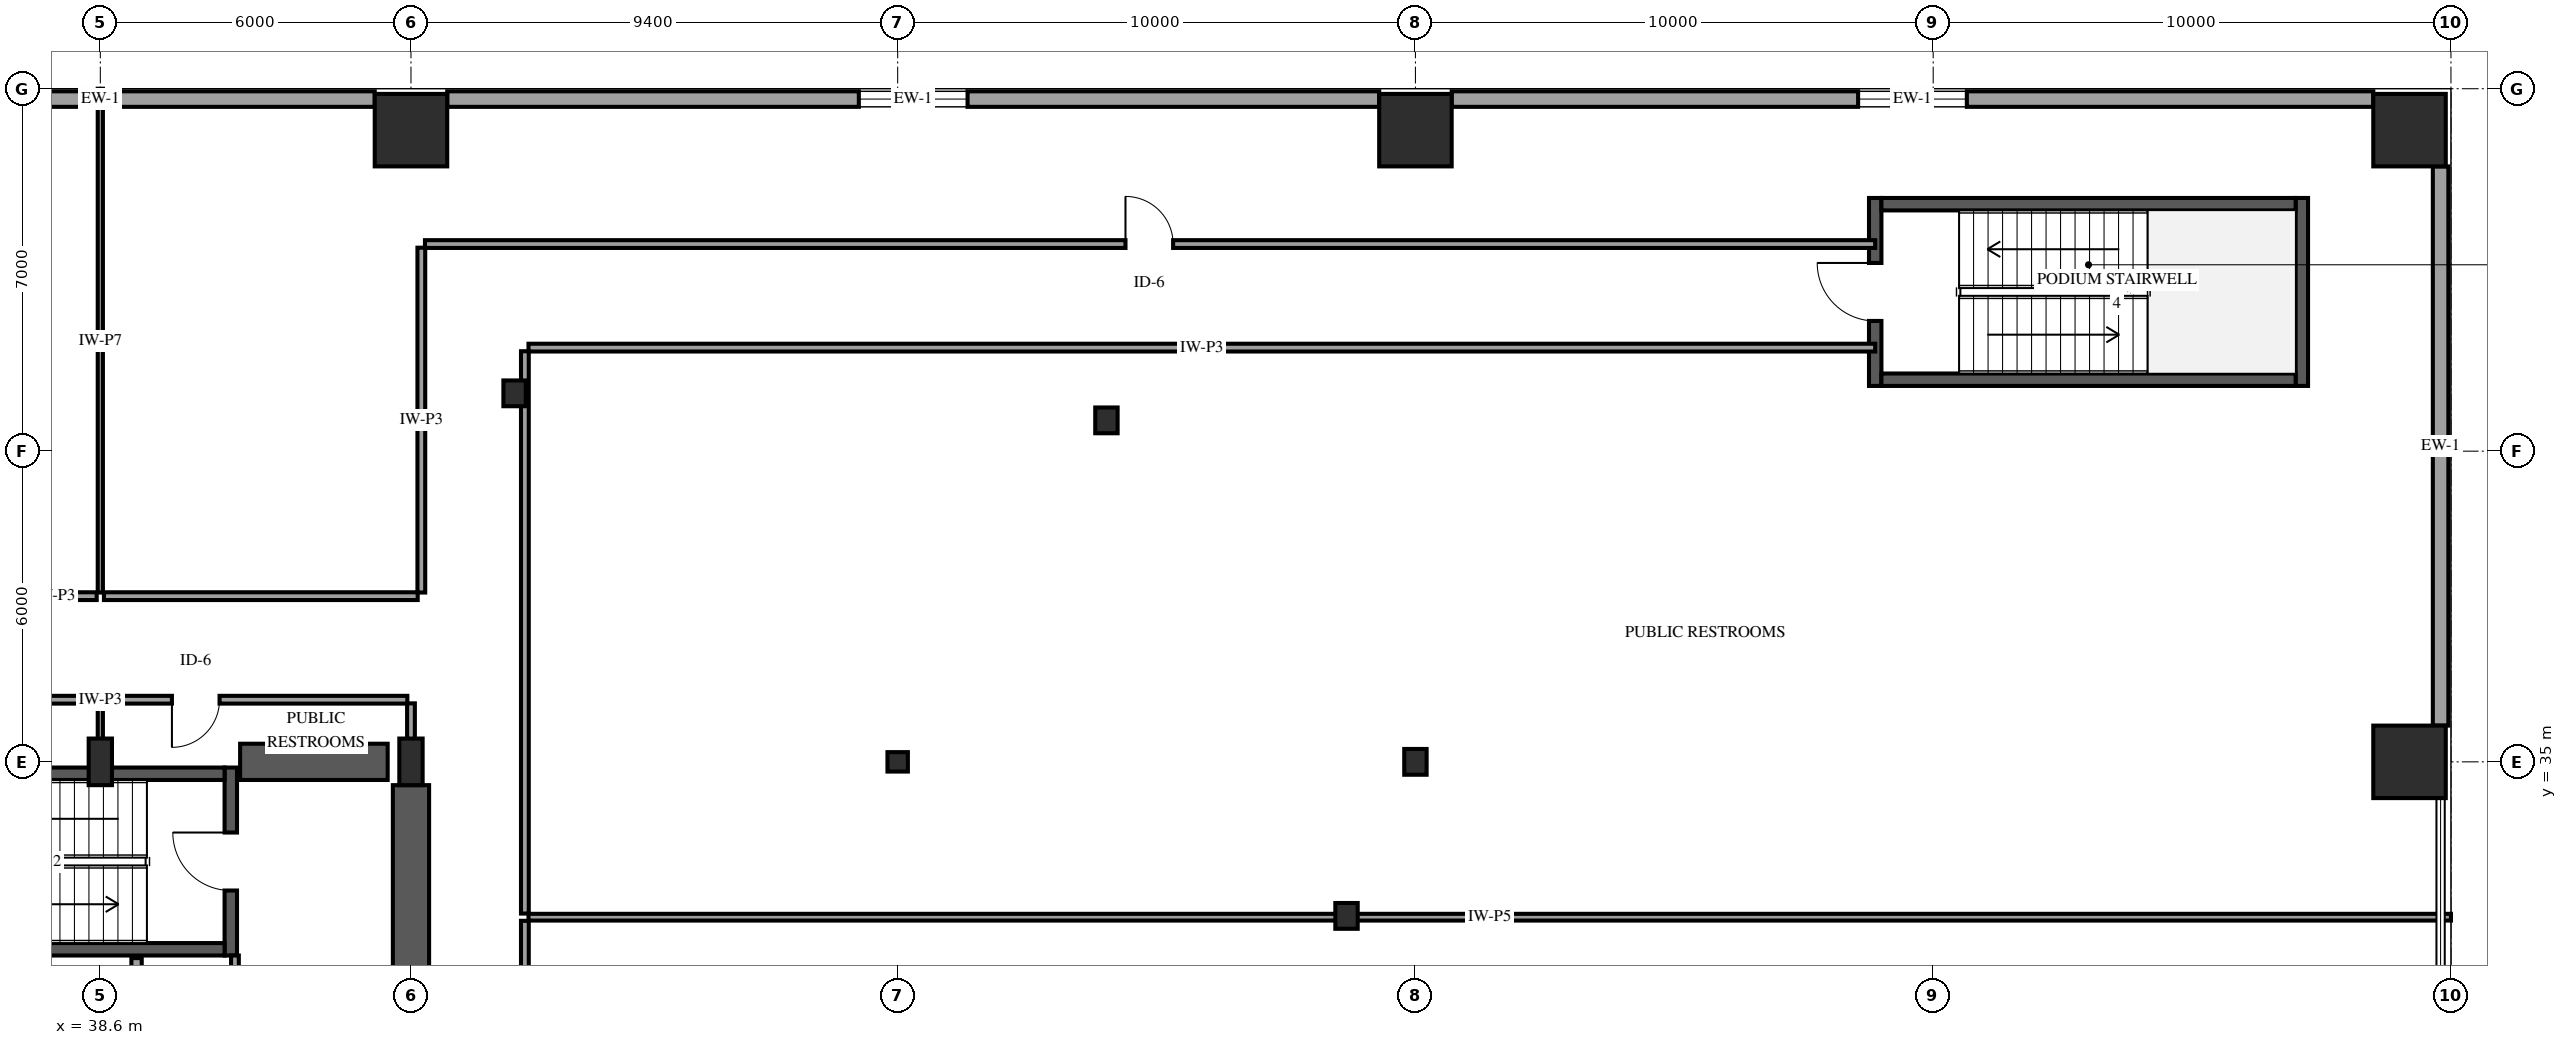
"""IFC4 building model, lengths in metres.
Left out: names, types, materials, properties, quantities, classifications, styles, units other than length and angle.
Written with IfcOpenShell. Run it as: python <this file> out.ifc"""

import sys

from ifc_helpers import new_model, si_unit, direction, frame, frame_2d, origin, origin_2d, place, context, subcontext, project, spatial, rectangle, i_section, extrude, element, fill, save


model = new_model("IFC4")
c1 = context("Model", 3, precision=1e-05, world=origin(), true_north=direction((0.0, 1.0)))
c2 = subcontext(c1, "Body", "Model", "MODEL_VIEW")
j1 = project(units=[si_unit("LENGTHUNIT", "METRE"), si_unit("PLANEANGLEUNIT", "RADIAN")], contexts=[c1])
p1 = place(None, origin())
s1 = spatial("IfcSite", under=j1, at=p1, CompositionType="ELEMENT")
p2 = place(p1, origin())
s2 = spatial("IfcBuilding", under=s1, at=p2, CompositionType="ELEMENT")
p3 = place(p2, frame((0.0, 0.0, 11.4)))
s3 = spatial("IfcBuildingStorey", under=s2, at=p3, CompositionType="ELEMENT", Elevation=11.4)
p4 = place(p3, frame((41.12, 31.26, 0.0), z_axis=(0.0, 0.0, 1.0), x_axis=(0.0, 1.0, 0.0)))
e1 = element("IfcWall", 1, at=p4, inside=s3, PredefinedType="SHEAR", context=c2, shape_type="SweptSolid", body=[
    extrude(rectangle(XDim=3.63, YDim=0.24, at=frame_2d((1.815, 0.0))), origin(), (0.0, 0.0, 1.0), 4.8),
])
p5 = place(p4, frame((1.255, 0.0, 0.0)))
e2 = element("IfcOpeningElement", 2, at=p5, cuts=e1, PredefinedType="OPENING", context=c2, shape_type="SweptSolid", body=[
    extrude(rectangle(XDim=1.12, YDim=2.15, at=frame_2d((0.56, 1.075))), frame((0.0, 0.13, 0.0), z_axis=(0.0, -1.0, 0.0), x_axis=(1.0, 0.0, 0.0)), (0.0, 0.0, 1.0), 0.26),
])
for number, where, z_axis, x_axis in (
    (3, (33.0, 31.38, 0.0), (0.0, 0.0, 1.0), (1.0, 0.0, 0.0)),
    (4, (33.0, 34.77, 0.0), (0.0, 0.0, 1.0), (1.0, 0.0, 0.0)),
):
    element("IfcWall", number, at=place(p3, frame(where, z_axis=z_axis, x_axis=x_axis)), inside=s3, PredefinedType="SHEAR", context=c2, shape_type="SweptSolid", body=[
        extrude(rectangle(XDim=8.0, YDim=0.24, at=frame_2d((4.0, 0.0))), origin(), (0.0, 0.0, 1.0), 4.8),
    ])
p6 = place(p3, frame((72.88, 42.26, 0.0), z_axis=(0.0, 0.0, 1.0), x_axis=(0.0, 1.0, 0.0)))
e5 = element("IfcWall", 5, at=p6, inside=s3, PredefinedType="SHEAR", context=c2, shape_type="SweptSolid", body=[
    extrude(rectangle(XDim=3.63, YDim=0.24, at=frame_2d((1.815, 0.0))), origin(), (0.0, 0.0, 1.0), 4.8),
])
p7 = place(p6, frame((1.255, 0.0, 0.0)))
e6 = element("IfcOpeningElement", 6, at=p7, cuts=e5, PredefinedType="OPENING", context=c2, shape_type="SweptSolid", body=[
    extrude(rectangle(XDim=1.12, YDim=2.15, at=frame_2d((0.56, 1.075))), frame((0.0, 0.13, 0.0), z_axis=(0.0, -1.0, 0.0), x_axis=(1.0, 0.0, 0.0)), (0.0, 0.0, 1.0), 0.26),
])
p8 = place(p3, frame((81.12, 42.26, 0.0), z_axis=(0.0, 0.0, 1.0), x_axis=(0.0, 1.0, 0.0)))
e7 = element("IfcWall", 7, at=p8, inside=s3, PredefinedType="SHEAR", context=c2, shape_type="SweptSolid", body=[
    extrude(rectangle(XDim=3.63, YDim=0.24, at=frame_2d((1.815, 0.0))), origin(), (0.0, 0.0, 1.0), 4.8),
])
for number, where, z_axis, x_axis in (
    (8, (73.0, 42.38, 0.0), (0.0, 0.0, 1.0), (1.0, 0.0, 0.0)),
    (9, (73.0, 45.77, 0.0), (0.0, 0.0, 1.0), (1.0, 0.0, 0.0)),
):
    element("IfcWall", number, at=place(p3, frame(where, z_axis=z_axis, x_axis=x_axis)), inside=s3, PredefinedType="SHEAR", context=c2, shape_type="SweptSolid", body=[
        extrude(rectangle(XDim=8.0, YDim=0.24, at=frame_2d((4.0, 0.0))), origin(), (0.0, 0.0, 1.0), 4.8),
    ])
p9 = place(p3, frame((41.3, 35.0, 0.0), z_axis=(0.0, 0.0, 1.0), x_axis=(1.0, 0.0, 0.0)))
e10 = element("IfcWall", 10, at=p9, inside=s3, PredefinedType="SHEAR", context=c2, shape_type="SweptSolid", body=[
    extrude(rectangle(XDim=2.85, YDim=0.7, at=frame_2d((1.425, 0.0))), origin(), (0.0, 0.0, 1.0), 4.8),
])
p10 = place(p3, frame((44.6, 29.8, 0.0), z_axis=(0.0, 0.0, 1.0), x_axis=(0.0, 1.0, 0.0)))
e11 = element("IfcWall", 11, at=p10, inside=s3, PredefinedType="SHEAR", context=c2, shape_type="SweptSolid", body=[
    extrude(rectangle(XDim=4.75, YDim=0.7, at=frame_2d((2.375, 0.0))), origin(), (0.0, 0.0, 1.0), 4.8),
])
for number, where, z_axis, x_axis in (
    (12, (38.6, 35.0, 0.0), (0.0, 0.0, 1.0), (1.0, 0.0, 0.0)),
    (13, (44.6, 35.0, 0.0), (0.0, 0.0, 1.0), (1.0, 0.0, 0.0)),
):
    element("IfcColumn", number, at=place(p3, frame(where, z_axis=z_axis, x_axis=x_axis)), inside=s3, PredefinedType="PILASTER", context=c2, shape_type="SweptSolid", body=[
        extrude(rectangle(XDim=0.45, YDim=0.9, at=origin_2d()), origin(), (0.0, 0.0, 1.0), 4.8),
    ])
p11 = place(p3, frame((64.0, 35.0, 0.0), z_axis=(0.0, 0.0, 1.0), x_axis=(1.0, 0.0, 0.0)))
e14 = element("IfcColumn", 14, at=p11, inside=s3, PredefinedType="COLUMN", context=c2, shape_type="SweptSolid", body=[
    extrude(i_section(OverallWidth=0.432, OverallDepth=0.498, WebThickness=0.056, FlangeThickness=0.089, FilletRadius=0.038, at=origin_2d()), origin(), (0.0, 0.0, 1.0), 4.8),
])
for number, where, z_axis, x_axis in (
    (15, (83.2, 35.0, 0.0), (0.0, 0.0, 1.0), (1.0, 0.0, 0.0)),
    (16, (64.0, 47.2, 0.0), (0.0, 0.0, 1.0), (1.0, 0.0, 0.0)),
    (17, (83.2, 47.2, 0.0), (0.0, 0.0, 1.0), (1.0, 0.0, 0.0)),
    (18, (44.6, 47.2, 0.0), (0.0, 0.0, 1.0), (1.0, 0.0, 0.0)),
):
    element("IfcColumn", number, at=place(p3, frame(where, z_axis=z_axis, x_axis=x_axis)), inside=s3, PredefinedType="COLUMN", context=c2, shape_type="SweptSolid", body=[
        extrude(rectangle(XDim=1.4, YDim=1.4, at=origin_2d()), origin(), (0.0, 0.0, 1.0), 4.8),
    ])
p12 = place(p3, frame((54.0, 35.0, 0.0), z_axis=(0.0, 0.0, 1.0), x_axis=(1.0, 0.0, 0.0)))
e19 = element("IfcColumn", 19, at=p12, inside=s3, PredefinedType="COLUMN", context=c2, shape_type="SweptSolid", body=[
    extrude(i_section(OverallWidth=0.394, OverallDepth=0.375, WebThickness=0.017, FlangeThickness=0.028, FilletRadius=0.038, at=origin_2d()), origin(), (0.0, 0.0, 1.0), 4.8),
])
for number, where, z_axis, x_axis in (
    (20, (62.669, 32.025, 0.0), (0.0, 0.0, 1.0), (1.0, 0.0, 0.0)),
    (21, (58.032, 41.595, 0.0), (0.0, 0.0, 1.0), (1.0, 0.0, 0.0)),
    (22, (46.601, 42.117, 0.0), (0.0, 0.0, 1.0), (1.0, 0.0, 0.0)),
):
    element("IfcColumn", number, at=place(p3, frame(where, z_axis=z_axis, x_axis=x_axis)), inside=s3, PredefinedType="COLUMN", context=c2, shape_type="SweptSolid", body=[
        extrude(i_section(OverallWidth=0.432, OverallDepth=0.498, WebThickness=0.056, FlangeThickness=0.089, FilletRadius=0.038, at=origin_2d()), origin(), (0.0, 0.0, 1.0), 4.8),
    ])
p13 = place(p3, frame((33.3, 47.8, 0.0), z_axis=(0.0, 0.0, 1.0), x_axis=(1.0, 0.0, 0.0)))
e23 = element("IfcWall", 23, at=p13, inside=s3, PredefinedType="SOLIDWALL", context=c2, shape_type="SweptSolid", body=[
    extrude(rectangle(XDim=10.6, YDim=0.3, at=frame_2d((5.3, 0.0))), origin(), (0.0, 0.0, 1.0), 3.536),
])
p14 = place(p13, frame((0.8, 0.0, 0.85)))
e24 = element("IfcOpeningElement", 24, at=p14, cuts=e23, PredefinedType="OPENING", context=c2, shape_type="SweptSolid", body=[
    extrude(rectangle(XDim=2.1, YDim=1.8, at=frame_2d((1.05, 0.9))), frame((0.0, 0.16, 0.0), z_axis=(0.0, -1.0, 0.0), x_axis=(1.0, 0.0, 0.0)), (0.0, 0.0, 1.0), 0.32),
])
p15 = place(p3, frame((45.3, 47.8, 0.0), z_axis=(0.0, 0.0, 1.0), x_axis=(1.0, 0.0, 0.0)))
e25 = element("IfcWall", 25, at=p15, inside=s3, PredefinedType="SOLIDWALL", context=c2, shape_type="SweptSolid", body=[
    extrude(rectangle(XDim=18.0, YDim=0.3, at=frame_2d((9.0, 0.0))), origin(), (0.0, 0.0, 1.0), 3.536),
])
p16 = place(p15, frame((7.95, 0.0, 0.85)))
e26 = element("IfcOpeningElement", 26, at=p16, cuts=e25, PredefinedType="OPENING", context=c2, shape_type="SweptSolid", body=[
    extrude(rectangle(XDim=2.1, YDim=1.8, at=frame_2d((1.05, 0.9))), frame((0.0, 0.16, 0.0), z_axis=(0.0, -1.0, 0.0), x_axis=(1.0, 0.0, 0.0)), (0.0, 0.0, 1.0), 0.32),
])
p17 = place(p3, frame((64.7, 47.8, 0.0), z_axis=(0.0, 0.0, 1.0), x_axis=(1.0, 0.0, 0.0)))
e27 = element("IfcWall", 27, at=p17, inside=s3, PredefinedType="SOLIDWALL", context=c2, shape_type="SweptSolid", body=[
    extrude(rectangle(XDim=17.8, YDim=0.3, at=frame_2d((8.9, 0.0))), origin(), (0.0, 0.0, 1.0), 3.536),
])
p18 = place(p17, frame((7.85, 0.0, 0.85)))
e28 = element("IfcOpeningElement", 28, at=p18, cuts=e27, PredefinedType="OPENING", context=c2, shape_type="SweptSolid", body=[
    extrude(rectangle(XDim=2.1, YDim=1.8, at=frame_2d((1.05, 0.9))), frame((0.0, 0.16, 0.0), z_axis=(0.0, -1.0, 0.0), x_axis=(1.0, 0.0, 0.0)), (0.0, 0.0, 1.0), 0.32),
])
p19 = place(p3, frame((83.8, 46.5, 0.0), z_axis=(0.0, 0.0, 1.0), x_axis=(0.0, -1.0, 0.0)))
e29 = element("IfcWall", 29, at=p19, inside=s3, PredefinedType="SOLIDWALL", context=c2, shape_type="SweptSolid", body=[
    extrude(rectangle(XDim=10.8, YDim=0.3, at=frame_2d((5.4, 0.0))), origin(), (0.0, 0.0, 1.0), 3.536),
])
p20 = place(p3, frame((39.3, 29.11, 0.0), z_axis=(0.0, 0.0, 1.0), x_axis=(0.0, 1.0, 0.0)))
e30 = element("IfcWall", 30, at=p20, inside=s3, PredefinedType="SOLIDWALL", context=c2, shape_type="SweptSolid", body=[
    extrude(rectangle(XDim=2.1, YDim=0.2, at=frame_2d((1.05, 0.0))), origin(), (0.0, 0.0, 1.0), 4.48),
])
p21 = place(p3, frame((46.87, 32.0, 0.0), z_axis=(0.0, 0.0, 1.0), x_axis=(1.0, 0.0, 0.0)))
e31 = element("IfcWall", 31, at=p21, inside=s3, PredefinedType="PARTITIONING", context=c2, shape_type="SweptSolid", body=[
    extrude(rectangle(XDim=37.13, YDim=0.13, at=frame_2d((18.565, 0.0))), origin(), (0.0, 0.0, 1.0), 4.48),
])
p22 = place(p3, frame((44.87, 45.0, 0.0), z_axis=(0.0, 0.0, 1.0), x_axis=(1.0, 0.0, 0.0)))
e32 = element("IfcWall", 32, at=p22, inside=s3, PredefinedType="PARTITIONING", context=c2, shape_type="SweptSolid", body=[
    extrude(rectangle(XDim=28.01, YDim=0.15, at=frame_2d((14.005, 0.0))), origin(), (0.0, 0.0, 1.0), 4.48),
])
p23 = place(p22, frame((13.53, 0.0, 0.0)))
e33 = element("IfcOpeningElement", 33, at=p23, cuts=e32, PredefinedType="OPENING", context=c2, shape_type="SweptSolid", body=[
    extrude(rectangle(XDim=0.92, YDim=2.12, at=frame_2d((0.46, 1.06))), frame((0.0, 0.085, 0.0), z_axis=(0.0, -1.0, 0.0), x_axis=(1.0, 0.0, 0.0)), (0.0, 0.0, 1.0), 0.17),
])
p24 = place(p3, frame((72.88, 43.0, 0.0), z_axis=(0.0, 0.0, 1.0), x_axis=(-1.0, 0.0, 0.0)))
e34 = element("IfcWall", 34, at=p24, inside=s3, PredefinedType="PARTITIONING", context=c2, shape_type="SweptSolid", body=[
    extrude(rectangle(XDim=26.01, YDim=0.15, at=frame_2d((13.005, 0.0))), origin(), (0.0, 0.0, 1.0), 4.48),
])
p25 = place(p3, frame((46.8, 31.93, 0.0), z_axis=(0.0, 0.0, 1.0), x_axis=(0.0, -1.0, 0.0)))
e35 = element("IfcWall", 35, at=p25, inside=s3, PredefinedType="PARTITIONING", context=c2, shape_type="SweptSolid", body=[
    extrude(rectangle(XDim=13.86, YDim=0.15, at=frame_2d((6.93, 0.0))), origin(), (0.0, 0.0, 1.0), 4.48),
])
p26 = place(p25, frame((6.455, 0.0, 0.0)))
e36 = element("IfcOpeningElement", 36, at=p26, cuts=e35, PredefinedType="OPENING", context=c2, shape_type="SweptSolid", body=[
    extrude(rectangle(XDim=0.92, YDim=2.12, at=frame_2d((0.46, 1.06))), frame((0.0, 0.085, 0.0), z_axis=(0.0, -1.0, 0.0), x_axis=(1.0, 0.0, 0.0)), (0.0, 0.0, 1.0), 0.17),
])
p27 = place(p3, frame((46.8, 42.93, 0.0), z_axis=(0.0, 0.0, 1.0), x_axis=(0.0, -1.0, 0.0)))
e37 = element("IfcWall", 37, at=p27, inside=s3, PredefinedType="PARTITIONING", context=c2, shape_type="SweptSolid", body=[
    extrude(rectangle(XDim=10.86, YDim=0.15, at=frame_2d((5.43, 0.0))), origin(), (0.0, 0.0, 1.0), 4.48),
])
p28 = place(p3, frame((38.6, 48.0, 0.0), z_axis=(0.0, 0.0, 1.0), x_axis=(0.0, -1.0, 0.0)))
e38 = element("IfcWall", 38, at=p28, inside=s3, PredefinedType="PARTITIONING", context=c2, shape_type="SweptSolid", body=[
    extrude(rectangle(XDim=9.73, YDim=0.1, at=frame_2d((4.865, 0.0))), origin(), (0.0, 0.0, 1.0), 4.48),
])
p29 = place(p3, frame((30.67, 38.2, 0.0), z_axis=(0.0, 0.0, 1.0), x_axis=(1.0, 0.0, 0.0)))
e39 = element("IfcWall", 39, at=p29, inside=s3, PredefinedType="PARTITIONING", context=c2, shape_type="SweptSolid", body=[
    extrude(rectangle(XDim=7.86, YDim=0.15, at=frame_2d((3.93, 0.0))), origin(), (0.0, 0.0, 1.0), 4.48),
])
p30 = place(p3, frame((44.8, 38.27, 0.0), z_axis=(0.0, 0.0, 1.0), x_axis=(0.0, 1.0, 0.0)))
e40 = element("IfcWall", 40, at=p30, inside=s3, PredefinedType="PARTITIONING", context=c2, shape_type="SweptSolid", body=[
    extrude(rectangle(XDim=6.66, YDim=0.15, at=frame_2d((3.33, 0.0))), origin(), (0.0, 0.0, 1.0), 3.602),
])
p31 = place(p3, frame((38.67, 38.2, 0.0), z_axis=(0.0, 0.0, 1.0), x_axis=(1.0, 0.0, 0.0)))
e41 = element("IfcWall", 41, at=p31, inside=s3, PredefinedType="PARTITIONING", context=c2, shape_type="SweptSolid", body=[
    extrude(rectangle(XDim=6.06, YDim=0.15, at=frame_2d((3.03, 0.0))), origin(), (0.0, 0.0, 1.0), 4.48),
])
p32 = place(p3, frame((38.53, 36.2, 0.0), z_axis=(0.0, 0.0, 1.0), x_axis=(-1.0, 0.0, 0.0)))
e42 = element("IfcWall", 42, at=p32, inside=s3, PredefinedType="PARTITIONING", context=c2, shape_type="SweptSolid", body=[
    extrude(rectangle(XDim=5.86, YDim=0.15, at=frame_2d((2.93, 0.0))), origin(), (0.0, 0.0, 1.0), 4.48),
])
p33 = place(p32, frame((2.455, 0.0, 0.0)))
e43 = element("IfcOpeningElement", 43, at=p33, cuts=e42, PredefinedType="OPENING", context=c2, shape_type="SweptSolid", body=[
    extrude(rectangle(XDim=0.92, YDim=2.12, at=frame_2d((0.46, 1.06))), frame((0.0, 0.085, 0.0), z_axis=(0.0, -1.0, 0.0), x_axis=(1.0, 0.0, 0.0)), (0.0, 0.0, 1.0), 0.17),
])
p34 = place(p3, frame((44.53, 36.2, 0.0), z_axis=(0.0, 0.0, 1.0), x_axis=(-1.0, 0.0, 0.0)))
e44 = element("IfcWall", 44, at=p34, inside=s3, PredefinedType="PARTITIONING", context=c2, shape_type="SweptSolid", body=[
    extrude(rectangle(XDim=5.86, YDim=0.15, at=frame_2d((2.93, 0.0))), origin(), (0.0, 0.0, 1.0), 4.48),
])
p35 = place(p34, frame((3.627, 0.0, 0.0)))
e45 = element("IfcOpeningElement", 45, at=p35, cuts=e44, PredefinedType="OPENING", context=c2, shape_type="SweptSolid", body=[
    extrude(rectangle(XDim=0.92, YDim=2.12, at=frame_2d((0.46, 1.06))), frame((0.0, 0.085, 0.0), z_axis=(0.0, -1.0, 0.0), x_axis=(1.0, 0.0, 0.0)), (0.0, 0.0, 1.0), 0.17),
])
p36 = place(p3, frame((41.2, 29.07, 0.0), z_axis=(0.0, 0.0, 1.0), x_axis=(0.0, 1.0, 0.0)))
e46 = element("IfcWall", 46, at=p36, inside=s3, PredefinedType="PARTITIONING", context=c2, shape_type="SweptSolid", body=[
    extrude(rectangle(XDim=2.19, YDim=0.15, at=frame_2d((1.095, 0.0))), origin(), (0.0, 0.0, 1.0), 4.48),
])
p37 = place(p36, frame((0.555, 0.0, 0.0)))
e47 = element("IfcOpeningElement", 47, at=p37, cuts=e46, PredefinedType="OPENING", context=c2, shape_type="SweptSolid", body=[
    extrude(rectangle(XDim=1.08, YDim=2.15, at=frame_2d((0.54, 1.075))), frame((0.0, 0.085, 0.0), z_axis=(0.0, -1.0, 0.0), x_axis=(1.0, 0.0, 0.0)), (0.0, 0.0, 1.0), 0.17),
])
p38 = place(p3, frame((44.6, 35.07, 0.0), z_axis=(0.0, 0.0, 1.0), x_axis=(0.0, 1.0, 0.0)))
e48 = element("IfcWall", 48, at=p38, inside=s3, PredefinedType="PARTITIONING", context=c2, shape_type="SweptSolid", body=[
    extrude(rectangle(XDim=1.06, YDim=0.15, at=frame_2d((0.53, 0.0))), origin(), (0.0, 0.0, 1.0), 3.602),
])
p39 = place(p3, frame((38.6, 36.13, 0.0), z_axis=(0.0, 0.0, 1.0), x_axis=(0.0, -1.0, 0.0)))
e49 = element("IfcWall", 49, at=p39, inside=s3, PredefinedType="PARTITIONING", context=c2, shape_type="SweptSolid", body=[
    extrude(rectangle(XDim=1.06, YDim=0.1, at=frame_2d((0.53, 0.0))), origin(), (0.0, 0.0, 1.0), 4.48),
])
p40 = place(p16, origin())
e50 = element("IfcWindow", 50, at=p40, inside=s3, PartitioningType="SINGLE_PANEL", PredefinedType="WINDOW", context=c2, shape_type="SweptSolid", body=[
    extrude(rectangle(XDim=2.1, YDim=1.8, at=frame_2d((1.05, 0.9))), frame((0.0, 0.03, 0.0), z_axis=(0.0, -1.0, 0.0), x_axis=(1.0, 0.0, 0.0)), (0.0, 0.0, 1.0), 0.06),
])
fill(e26, e50)
p41 = place(p18, origin())
e51 = element("IfcWindow", 51, at=p41, inside=s3, PartitioningType="SINGLE_PANEL", PredefinedType="WINDOW", context=c2, shape_type="SweptSolid", body=[
    extrude(rectangle(XDim=2.1, YDim=1.8, at=frame_2d((1.05, 0.9))), frame((0.0, 0.03, 0.0), z_axis=(0.0, -1.0, 0.0), x_axis=(1.0, 0.0, 0.0)), (0.0, 0.0, 1.0), 0.06),
])
fill(e28, e51)
p42 = place(p5, origin())
e52 = element("IfcDoor", 52, at=p42, inside=s3, OperationType="SINGLE_SWING_RIGHT", PredefinedType="DOOR", context=c2, shape_type="SweptSolid", body=[
    extrude(rectangle(XDim=1.12, YDim=2.15, at=frame_2d((0.56, 1.075))), frame((0.0, 0.025, 0.0), z_axis=(0.0, -1.0, 0.0), x_axis=(1.0, 0.0, 0.0)), (0.0, 0.0, 1.0), 0.05),
])
fill(e2, e52)
p43 = place(p7, origin())
e53 = element("IfcDoor", 53, at=p43, inside=s3, OperationType="SINGLE_SWING_RIGHT", PredefinedType="DOOR", context=c2, shape_type="SweptSolid", body=[
    extrude(rectangle(XDim=1.12, YDim=2.15, at=frame_2d((0.56, 1.075))), frame((0.0, 0.025, 0.0), z_axis=(0.0, -1.0, 0.0), x_axis=(1.0, 0.0, 0.0)), (0.0, 0.0, 1.0), 0.05),
])
fill(e6, e53)
p44 = place(p23, origin())
e54 = element("IfcDoor", 54, at=p44, inside=s3, OperationType="SINGLE_SWING_LEFT", PredefinedType="DOOR", context=c2, shape_type="SweptSolid", body=[
    extrude(rectangle(XDim=0.92, YDim=2.12, at=frame_2d((0.46, 1.06))), frame((0.0, 0.025, 0.0), z_axis=(0.0, -1.0, 0.0), x_axis=(1.0, 0.0, 0.0)), (0.0, 0.0, 1.0), 0.05),
])
fill(e33, e54)
p45 = place(p35, origin())
e55 = element("IfcDoor", 55, at=p45, inside=s3, OperationType="SINGLE_SWING_RIGHT", PredefinedType="DOOR", context=c2, shape_type="SweptSolid", body=[
    extrude(rectangle(XDim=0.92, YDim=2.12, at=frame_2d((0.46, 1.06))), frame((0.0, 0.025, 0.0), z_axis=(0.0, -1.0, 0.0), x_axis=(1.0, 0.0, 0.0)), (0.0, 0.0, 1.0), 0.05),
])
fill(e45, e55)
save(model, sys.argv[1])
